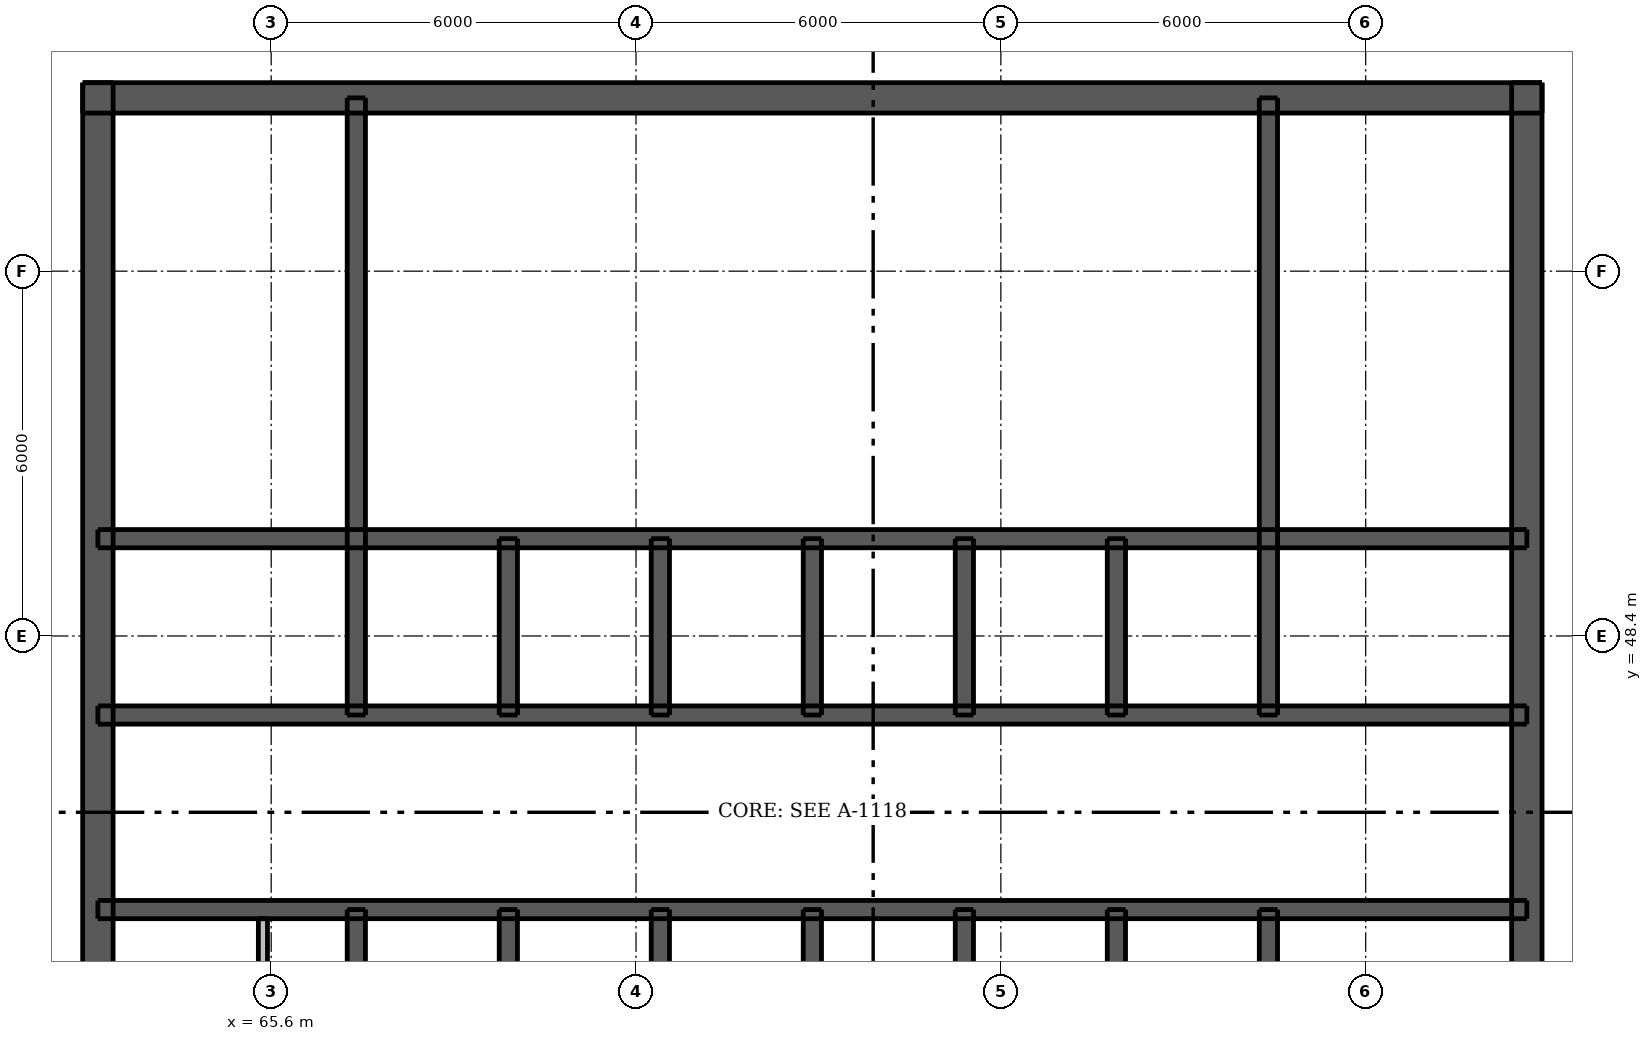
"""IFC4 building model, lengths in metres.
Left out: names, types, materials, properties, quantities, classifications, styles, units other than length and angle.
Written with IfcOpenShell. Run it as: python <this file> out.ifc"""

import sys

from ifc_helpers import new_model, si_unit, direction, frame, frame_2d, origin, place, context, subcontext, project, spatial, rectangle, extrude, element, fill, save


model = new_model("IFC4")
c1 = context("Model", 3, precision=1e-05, world=origin(), true_north=direction((0.0, 1.0)))
c2 = subcontext(c1, "Body", "Model", "MODEL_VIEW")
j1 = project(units=[si_unit("LENGTHUNIT", "METRE"), si_unit("PLANEANGLEUNIT", "RADIAN")], contexts=[c1])
p1 = place(None, origin())
s1 = spatial("IfcSite", under=j1, at=p1, CompositionType="ELEMENT")
p2 = place(p1, origin())
s2 = spatial("IfcBuilding", under=s1, at=p2, CompositionType="ELEMENT")
p3 = place(p2, frame((0.0, 0.0, 258.7)))
s3 = spatial("IfcBuildingStorey", under=s2, at=p3, CompositionType="ELEMENT", Elevation=258.7)
p4 = place(p3, frame((62.5, 57.25, 0.0), z_axis=(0.0, 0.0, 1.0), x_axis=(1.0, 0.0, 0.0)))
e1 = element("IfcWall", 1, at=p4, inside=s3, PredefinedType="SHEAR", context=c2, shape_type="SweptSolid", body=[
    extrude(rectangle(XDim=24.0, YDim=0.5, at=frame_2d((12.0, 0.0))), origin(), (0.0, 0.0, 1.0), 3.05),
])
p5 = place(p4, frame((21.025, 0.0, 0.0)))
e2 = element("IfcOpeningElement", 2, at=p5, cuts=e1, PredefinedType="OPENING", context=c2, shape_type="SweptSolid", body=[
    extrude(rectangle(XDim=1.1, YDim=2.1, at=frame_2d((0.55, 1.05))), frame((0.0, 0.26, 0.0), z_axis=(0.0, -1.0, 0.0), x_axis=(1.0, 0.0, 0.0)), (0.0, 0.0, 1.0), 0.52),
])
p6 = place(p4, frame((1.875, 0.0, 0.0)))
e3 = element("IfcOpeningElement", 3, at=p6, cuts=e1, PredefinedType="OPENING", context=c2, shape_type="SweptSolid", body=[
    extrude(rectangle(XDim=1.1, YDim=2.1, at=frame_2d((0.55, 1.05))), frame((0.0, 0.26, 0.0), z_axis=(0.0, -1.0, 0.0), x_axis=(1.0, 0.0, 0.0)), (0.0, 0.0, 1.0), 0.52),
])
p7 = place(p4, frame((11.55, 0.0, 0.0)))
e4 = element("IfcOpeningElement", 4, at=p7, cuts=e1, PredefinedType="OPENING", context=c2, shape_type="SweptSolid", body=[
    extrude(rectangle(XDim=0.9, YDim=2.1, at=frame_2d((0.45, 1.05))), frame((0.0, 0.26, 0.0), z_axis=(0.0, -1.0, 0.0), x_axis=(1.0, 0.0, 0.0)), (0.0, 0.0, 1.0), 0.52),
])
p8 = place(p3, frame((62.75, 33.5, 0.0), z_axis=(0.0, 0.0, 1.0), x_axis=(0.0, 1.0, 0.0)))
e5 = element("IfcWall", 5, at=p8, inside=s3, PredefinedType="SHEAR", context=c2, shape_type="SweptSolid", body=[
    extrude(rectangle(XDim=24.0, YDim=0.5, at=frame_2d((12.0, 0.0))), origin(), (0.0, 0.0, 1.0), 3.05),
])
p9 = place(p8, frame((11.2, 0.0, 0.0)))
e6 = element("IfcOpeningElement", 6, at=p9, cuts=e5, PredefinedType="OPENING", context=c2, shape_type="SweptSolid", body=[
    extrude(rectangle(XDim=1.6, YDim=2.1, at=frame_2d((0.8, 1.05))), frame((0.0, 0.26, 0.0), z_axis=(0.0, -1.0, 0.0), x_axis=(1.0, 0.0, 0.0)), (0.0, 0.0, 1.0), 0.52),
])
p10 = place(p3, frame((86.25, 33.5, 0.0), z_axis=(0.0, 0.0, 1.0), x_axis=(0.0, 1.0, 0.0)))
e7 = element("IfcWall", 7, at=p10, inside=s3, PredefinedType="SHEAR", context=c2, shape_type="SweptSolid", body=[
    extrude(rectangle(XDim=24.0, YDim=0.5, at=frame_2d((12.0, 0.0))), origin(), (0.0, 0.0, 1.0), 3.05),
])
p11 = place(p10, frame((11.2, 0.0, 0.0)))
e8 = element("IfcOpeningElement", 8, at=p11, cuts=e7, PredefinedType="OPENING", context=c2, shape_type="SweptSolid", body=[
    extrude(rectangle(XDim=1.6, YDim=2.1, at=frame_2d((0.8, 1.05))), frame((0.0, 0.26, 0.0), z_axis=(0.0, -1.0, 0.0), x_axis=(1.0, 0.0, 0.0)), (0.0, 0.0, 1.0), 0.52),
])
p12 = place(p3, frame((62.75, 43.9, 0.0), z_axis=(0.0, 0.0, 1.0), x_axis=(1.0, 0.0, 0.0)))
e9 = element("IfcWall", 9, at=p12, inside=s3, PredefinedType="SHEAR", context=c2, shape_type="SweptSolid", body=[
    extrude(rectangle(XDim=23.5, YDim=0.3, at=frame_2d((11.75, 0.0))), origin(), (0.0, 0.0, 1.0), 3.05),
])
p13 = place(p12, frame((1.032, 0.0, 0.0)))
e10 = element("IfcOpeningElement", 10, at=p13, cuts=e9, PredefinedType="OPENING", context=c2, shape_type="SweptSolid", body=[
    extrude(rectangle(XDim=0.9, YDim=2.1, at=frame_2d((0.45, 1.05))), frame((0.0, 0.16, 0.0), z_axis=(0.0, -1.0, 0.0), x_axis=(1.0, 0.0, 0.0)), (0.0, 0.0, 1.0), 0.32),
])
p14 = place(p12, frame((3.007, 0.0, 0.0)))
e11 = element("IfcOpeningElement", 11, at=p14, cuts=e9, PredefinedType="OPENING", context=c2, shape_type="SweptSolid", body=[
    extrude(rectangle(XDim=0.8, YDim=2.1, at=frame_2d((0.4, 1.05))), frame((0.0, 0.16, 0.0), z_axis=(0.0, -1.0, 0.0), x_axis=(1.0, 0.0, 0.0)), (0.0, 0.0, 1.0), 0.32),
])
p15 = place(p12, frame((20.875, 0.0, 0.0)))
e12 = element("IfcOpeningElement", 12, at=p15, cuts=e9, PredefinedType="OPENING", context=c2, shape_type="SweptSolid", body=[
    extrude(rectangle(XDim=0.9, YDim=2.1, at=frame_2d((0.45, 1.05))), frame((0.0, 0.16, 0.0), z_axis=(0.0, -1.0, 0.0), x_axis=(1.0, 0.0, 0.0)), (0.0, 0.0, 1.0), 0.32),
])
p16 = place(p12, frame((5.05, 0.0, 0.0)))
e13 = element("IfcOpeningElement", 13, at=p16, cuts=e9, PredefinedType="OPENING", context=c2, shape_type="SweptSolid", body=[
    extrude(rectangle(XDim=0.9, YDim=2.1, at=frame_2d((0.45, 1.05))), frame((0.0, 0.16, 0.0), z_axis=(0.0, -1.0, 0.0), x_axis=(1.0, 0.0, 0.0)), (0.0, 0.0, 1.0), 0.32),
])
p17 = place(p12, frame((10.05, 0.0, 0.0)))
e14 = element("IfcOpeningElement", 14, at=p17, cuts=e9, PredefinedType="OPENING", context=c2, shape_type="SweptSolid", body=[
    extrude(rectangle(XDim=0.9, YDim=2.1, at=frame_2d((0.45, 1.05))), frame((0.0, 0.16, 0.0), z_axis=(0.0, -1.0, 0.0), x_axis=(1.0, 0.0, 0.0)), (0.0, 0.0, 1.0), 0.32),
])
p18 = place(p12, frame((12.55, 0.0, 0.0)))
e15 = element("IfcOpeningElement", 15, at=p18, cuts=e9, PredefinedType="OPENING", context=c2, shape_type="SweptSolid", body=[
    extrude(rectangle(XDim=0.9, YDim=2.1, at=frame_2d((0.45, 1.05))), frame((0.0, 0.16, 0.0), z_axis=(0.0, -1.0, 0.0), x_axis=(1.0, 0.0, 0.0)), (0.0, 0.0, 1.0), 0.32),
])
p19 = place(p12, frame((17.55, 0.0, 0.0)))
e16 = element("IfcOpeningElement", 16, at=p19, cuts=e9, PredefinedType="OPENING", context=c2, shape_type="SweptSolid", body=[
    extrude(rectangle(XDim=0.9, YDim=2.1, at=frame_2d((0.45, 1.05))), frame((0.0, 0.16, 0.0), z_axis=(0.0, -1.0, 0.0), x_axis=(1.0, 0.0, 0.0)), (0.0, 0.0, 1.0), 0.32),
])
p20 = place(p3, frame((62.75, 47.1, 0.0), z_axis=(0.0, 0.0, 1.0), x_axis=(1.0, 0.0, 0.0)))
e17 = element("IfcWall", 17, at=p20, inside=s3, PredefinedType="SHEAR", context=c2, shape_type="SweptSolid", body=[
    extrude(rectangle(XDim=23.5, YDim=0.3, at=frame_2d((11.75, 0.0))), origin(), (0.0, 0.0, 1.0), 3.05),
])
p21 = place(p20, frame((1.725, 0.0, 0.0)))
e18 = element("IfcOpeningElement", 18, at=p21, cuts=e17, PredefinedType="OPENING", context=c2, shape_type="SweptSolid", body=[
    extrude(rectangle(XDim=0.9, YDim=2.1, at=frame_2d((0.45, 1.05))), frame((0.0, 0.16, 0.0), z_axis=(0.0, -1.0, 0.0), x_axis=(1.0, 0.0, 0.0)), (0.0, 0.0, 1.0), 0.32),
])
p22 = place(p20, frame((20.875, 0.0, 0.0)))
e19 = element("IfcOpeningElement", 19, at=p22, cuts=e17, PredefinedType="OPENING", context=c2, shape_type="SweptSolid", body=[
    extrude(rectangle(XDim=0.9, YDim=2.1, at=frame_2d((0.45, 1.05))), frame((0.0, 0.16, 0.0), z_axis=(0.0, -1.0, 0.0), x_axis=(1.0, 0.0, 0.0)), (0.0, 0.0, 1.0), 0.32),
])
p23 = place(p20, frame((4.95, 0.0, 0.0)))
e20 = element("IfcOpeningElement", 20, at=p23, cuts=e17, PredefinedType="OPENING", context=c2, shape_type="SweptSolid", body=[
    extrude(rectangle(XDim=1.1, YDim=2.1, at=frame_2d((0.55, 1.05))), frame((0.0, 0.16, 0.0), z_axis=(0.0, -1.0, 0.0), x_axis=(1.0, 0.0, 0.0)), (0.0, 0.0, 1.0), 0.32),
])
p24 = place(p20, frame((7.45, 0.0, 0.0)))
e21 = element("IfcOpeningElement", 21, at=p24, cuts=e17, PredefinedType="OPENING", context=c2, shape_type="SweptSolid", body=[
    extrude(rectangle(XDim=1.1, YDim=2.1, at=frame_2d((0.55, 1.05))), frame((0.0, 0.16, 0.0), z_axis=(0.0, -1.0, 0.0), x_axis=(1.0, 0.0, 0.0)), (0.0, 0.0, 1.0), 0.32),
])
p25 = place(p20, frame((9.95, 0.0, 0.0)))
e22 = element("IfcOpeningElement", 22, at=p25, cuts=e17, PredefinedType="OPENING", context=c2, shape_type="SweptSolid", body=[
    extrude(rectangle(XDim=1.1, YDim=2.1, at=frame_2d((0.55, 1.05))), frame((0.0, 0.16, 0.0), z_axis=(0.0, -1.0, 0.0), x_axis=(1.0, 0.0, 0.0)), (0.0, 0.0, 1.0), 0.32),
])
p26 = place(p20, frame((12.45, 0.0, 0.0)))
e23 = element("IfcOpeningElement", 23, at=p26, cuts=e17, PredefinedType="OPENING", context=c2, shape_type="SweptSolid", body=[
    extrude(rectangle(XDim=1.1, YDim=2.1, at=frame_2d((0.55, 1.05))), frame((0.0, 0.16, 0.0), z_axis=(0.0, -1.0, 0.0), x_axis=(1.0, 0.0, 0.0)), (0.0, 0.0, 1.0), 0.32),
])
p27 = place(p20, frame((14.95, 0.0, 0.0)))
e24 = element("IfcOpeningElement", 24, at=p27, cuts=e17, PredefinedType="OPENING", context=c2, shape_type="SweptSolid", body=[
    extrude(rectangle(XDim=1.1, YDim=2.1, at=frame_2d((0.55, 1.05))), frame((0.0, 0.16, 0.0), z_axis=(0.0, -1.0, 0.0), x_axis=(1.0, 0.0, 0.0)), (0.0, 0.0, 1.0), 0.32),
])
p28 = place(p20, frame((17.45, 0.0, 0.0)))
e25 = element("IfcOpeningElement", 25, at=p28, cuts=e17, PredefinedType="OPENING", context=c2, shape_type="SweptSolid", body=[
    extrude(rectangle(XDim=1.1, YDim=2.1, at=frame_2d((0.55, 1.05))), frame((0.0, 0.16, 0.0), z_axis=(0.0, -1.0, 0.0), x_axis=(1.0, 0.0, 0.0)), (0.0, 0.0, 1.0), 0.32),
])
p29 = place(p3, frame((62.75, 50.0, 0.0), z_axis=(0.0, 0.0, 1.0), x_axis=(1.0, 0.0, 0.0)))
e26 = element("IfcWall", 26, at=p29, inside=s3, PredefinedType="SHEAR", context=c2, shape_type="SweptSolid", body=[
    extrude(rectangle(XDim=23.5, YDim=0.3, at=frame_2d((11.75, 0.0))), origin(), (0.0, 0.0, 1.0), 3.05),
])
p30 = place(p3, frame((67.0, 33.75, 0.0), z_axis=(0.0, 0.0, 1.0), x_axis=(0.0, 1.0, 0.0)))
e27 = element("IfcWall", 27, at=p30, inside=s3, PredefinedType="SHEAR", context=c2, shape_type="SweptSolid", body=[
    extrude(rectangle(XDim=10.15, YDim=0.3, at=frame_2d((5.075, 0.0))), origin(), (0.0, 0.0, 1.0), 3.05),
])
p31 = place(p30, frame((0.45, 0.0, 0.0)))
e28 = element("IfcOpeningElement", 28, at=p31, cuts=e27, PredefinedType="OPENING", context=c2, shape_type="SweptSolid", body=[
    extrude(rectangle(XDim=1.1, YDim=2.1, at=frame_2d((0.55, 1.05))), frame((0.0, 0.16, 0.0), z_axis=(0.0, -1.0, 0.0), x_axis=(1.0, 0.0, 0.0)), (0.0, 0.0, 1.0), 0.32),
])
for number, where, z_axis, x_axis in (
    (29, (67.0, 47.1, 0.0), (0.0, 0.0, 1.0), (0.0, 1.0, 0.0)),
    (30, (82.0, 33.75, 0.0), (0.0, 0.0, 1.0), (0.0, 1.0, 0.0)),
    (31, (82.0, 47.1, 0.0), (0.0, 0.0, 1.0), (0.0, 1.0, 0.0)),
):
    element("IfcWall", number, at=place(p3, frame(where, z_axis=z_axis, x_axis=x_axis)), inside=s3, PredefinedType="SHEAR", context=c2, shape_type="SweptSolid", body=[
        extrude(rectangle(XDim=10.15, YDim=0.3, at=frame_2d((5.075, 0.0))), origin(), (0.0, 0.0, 1.0), 3.05),
    ])
for number, where, z_axis, x_axis in (
    (32, (69.5, 41.0, 0.0), (0.0, 0.0, 1.0), (0.0, 1.0, 0.0)),
    (33, (69.5, 47.1, 0.0), (0.0, 0.0, 1.0), (0.0, 1.0, 0.0)),
    (34, (72.0, 41.0, 0.0), (0.0, 0.0, 1.0), (0.0, 1.0, 0.0)),
    (35, (72.0, 47.1, 0.0), (0.0, 0.0, 1.0), (0.0, 1.0, 0.0)),
    (36, (74.5, 41.0, 0.0), (0.0, 0.0, 1.0), (0.0, 1.0, 0.0)),
    (37, (74.5, 47.1, 0.0), (0.0, 0.0, 1.0), (0.0, 1.0, 0.0)),
    (38, (77.0, 41.0, 0.0), (0.0, 0.0, 1.0), (0.0, 1.0, 0.0)),
    (39, (77.0, 47.1, 0.0), (0.0, 0.0, 1.0), (0.0, 1.0, 0.0)),
    (40, (79.5, 41.0, 0.0), (0.0, 0.0, 1.0), (0.0, 1.0, 0.0)),
    (41, (79.5, 47.1, 0.0), (0.0, 0.0, 1.0), (0.0, 1.0, 0.0)),
):
    element("IfcWall", number, at=place(p3, frame(where, z_axis=z_axis, x_axis=x_axis)), inside=s3, PredefinedType="SHEAR", context=c2, shape_type="SweptSolid", body=[
        extrude(rectangle(XDim=2.9, YDim=0.3, at=frame_2d((1.45, 0.0))), origin(), (0.0, 0.0, 1.0), 3.05),
    ])
p32 = place(p3, frame((65.464, 41.15, 0.0), z_axis=(0.0, 0.0, 1.0), x_axis=(0.0, 1.0, 0.0)))
e42 = element("IfcWall", 42, at=p32, inside=s3, PredefinedType="PLUMBINGWALL", context=c2, shape_type="SweptSolid", body=[
    extrude(rectangle(XDim=2.6, YDim=0.15, at=frame_2d((1.3, 0.0))), origin(), (0.0, 0.0, 1.0), 3.05),
])
p33 = place(p5, origin())
e43 = element("IfcDoor", 43, at=p33, inside=s3, OperationType="SINGLE_SWING_RIGHT", PredefinedType="DOOR", context=c2, shape_type="SweptSolid", body=[
    extrude(rectangle(XDim=1.1, YDim=2.1, at=frame_2d((0.55, 1.05))), frame((0.0, -0.188, 0.0), z_axis=(0.0, -1.0, 0.0), x_axis=(1.0, 0.0, 0.0)), (0.0, 0.0, 1.0), 0.05),
])
fill(e2, e43)
p34 = place(p6, origin())
e44 = element("IfcDoor", 44, at=p34, inside=s3, OperationType="SINGLE_SWING_LEFT", PredefinedType="DOOR", context=c2, shape_type="SweptSolid", body=[
    extrude(rectangle(XDim=1.1, YDim=2.1, at=frame_2d((0.55, 1.05))), frame((0.0, -0.188, 0.0), z_axis=(0.0, -1.0, 0.0), x_axis=(1.0, 0.0, 0.0)), (0.0, 0.0, 1.0), 0.05),
])
fill(e3, e44)
p35 = place(p9, origin())
e45 = element("IfcDoor", 45, at=p35, inside=s3, OperationType="DOUBLE_DOOR_SINGLE_SWING", PredefinedType="DOOR", context=c2, shape_type="SweptSolid", body=[
    extrude(rectangle(XDim=1.6, YDim=2.1, at=frame_2d((0.8, 1.05))), frame((0.0, -0.188, 0.0), z_axis=(0.0, -1.0, 0.0), x_axis=(1.0, 0.0, 0.0)), (0.0, 0.0, 1.0), 0.05),
])
fill(e6, e45)
p36 = place(p11, origin())
e46 = element("IfcDoor", 46, at=p36, inside=s3, OperationType="DOUBLE_DOOR_SINGLE_SWING", PredefinedType="DOOR", context=c2, shape_type="SweptSolid", body=[
    extrude(rectangle(XDim=1.6, YDim=2.1, at=frame_2d((0.8, 1.05))), frame((0.0, 0.237, 0.0), z_axis=(0.0, -1.0, 0.0), x_axis=(1.0, 0.0, 0.0)), (0.0, 0.0, 1.0), 0.05),
])
fill(e8, e46)
p37 = place(p13, origin())
e47 = element("IfcDoor", 47, at=p37, inside=s3, OperationType="SINGLE_SWING_LEFT", PredefinedType="DOOR", context=c2, shape_type="SweptSolid", body=[
    extrude(rectangle(XDim=0.9, YDim=2.1, at=frame_2d((0.45, 1.05))), frame((0.0, -0.087, 0.0), z_axis=(0.0, -1.0, 0.0), x_axis=(1.0, 0.0, 0.0)), (0.0, 0.0, 1.0), 0.05),
])
fill(e10, e47)
p38 = place(p14, origin())
e48 = element("IfcDoor", 48, at=p38, inside=s3, OperationType="SINGLE_SWING_RIGHT", PredefinedType="DOOR", context=c2, shape_type="SweptSolid", body=[
    extrude(rectangle(XDim=0.8, YDim=2.1, at=frame_2d((0.4, 1.05))), frame((0.0, -0.087, 0.0), z_axis=(0.0, -1.0, 0.0), x_axis=(1.0, 0.0, 0.0)), (0.0, 0.0, 1.0), 0.05),
])
fill(e11, e48)
p39 = place(p15, origin())
e49 = element("IfcDoor", 49, at=p39, inside=s3, OperationType="SINGLE_SWING_LEFT", PredefinedType="DOOR", context=c2, shape_type="SweptSolid", body=[
    extrude(rectangle(XDim=0.9, YDim=2.1, at=frame_2d((0.45, 1.05))), frame((0.0, -0.087, 0.0), z_axis=(0.0, -1.0, 0.0), x_axis=(1.0, 0.0, 0.0)), (0.0, 0.0, 1.0), 0.05),
])
fill(e12, e49)
p40 = place(p21, origin())
e50 = element("IfcDoor", 50, at=p40, inside=s3, OperationType="SINGLE_SWING_LEFT", PredefinedType="DOOR", context=c2, shape_type="SweptSolid", body=[
    extrude(rectangle(XDim=0.9, YDim=2.1, at=frame_2d((0.45, 1.05))), frame((0.0, 0.138, 0.0), z_axis=(0.0, -1.0, 0.0), x_axis=(1.0, 0.0, 0.0)), (0.0, 0.0, 1.0), 0.05),
])
fill(e18, e50)
p41 = place(p22, origin())
e51 = element("IfcDoor", 51, at=p41, inside=s3, OperationType="SINGLE_SWING_LEFT", PredefinedType="DOOR", context=c2, shape_type="SweptSolid", body=[
    extrude(rectangle(XDim=0.9, YDim=2.1, at=frame_2d((0.45, 1.05))), frame((0.0, 0.138, 0.0), z_axis=(0.0, -1.0, 0.0), x_axis=(1.0, 0.0, 0.0)), (0.0, 0.0, 1.0), 0.05),
])
fill(e19, e51)
p42 = place(p7, origin())
e52 = element("IfcDoor", 52, at=p42, inside=s3, OperationType="SINGLE_SWING_RIGHT", PredefinedType="DOOR", context=c2, shape_type="SweptSolid", body=[
    extrude(rectangle(XDim=0.9, YDim=2.1, at=frame_2d((0.45, 1.05))), frame((0.0, -0.188, 0.0), z_axis=(0.0, -1.0, 0.0), x_axis=(1.0, 0.0, 0.0)), (0.0, 0.0, 1.0), 0.05),
])
fill(e4, e52)
p43 = place(p16, origin())
e53 = element("IfcDoor", 53, at=p43, inside=s3, OperationType="SINGLE_SWING_RIGHT", PredefinedType="DOOR", context=c2, shape_type="SweptSolid", body=[
    extrude(rectangle(XDim=0.9, YDim=2.1, at=frame_2d((0.45, 1.05))), frame((0.0, -0.087, 0.0), z_axis=(0.0, -1.0, 0.0), x_axis=(1.0, 0.0, 0.0)), (0.0, 0.0, 1.0), 0.05),
])
fill(e13, e53)
p44 = place(p17, origin())
e54 = element("IfcDoor", 54, at=p44, inside=s3, OperationType="SINGLE_SWING_RIGHT", PredefinedType="DOOR", context=c2, shape_type="SweptSolid", body=[
    extrude(rectangle(XDim=0.9, YDim=2.1, at=frame_2d((0.45, 1.05))), frame((0.0, -0.087, 0.0), z_axis=(0.0, -1.0, 0.0), x_axis=(1.0, 0.0, 0.0)), (0.0, 0.0, 1.0), 0.05),
])
fill(e14, e54)
p45 = place(p18, origin())
e55 = element("IfcDoor", 55, at=p45, inside=s3, OperationType="SINGLE_SWING_LEFT", PredefinedType="DOOR", context=c2, shape_type="SweptSolid", body=[
    extrude(rectangle(XDim=0.9, YDim=2.1, at=frame_2d((0.45, 1.05))), frame((0.0, -0.087, 0.0), z_axis=(0.0, -1.0, 0.0), x_axis=(1.0, 0.0, 0.0)), (0.0, 0.0, 1.0), 0.05),
])
fill(e15, e55)
p46 = place(p19, origin())
e56 = element("IfcDoor", 56, at=p46, inside=s3, OperationType="SINGLE_SWING_LEFT", PredefinedType="DOOR", context=c2, shape_type="SweptSolid", body=[
    extrude(rectangle(XDim=0.9, YDim=2.1, at=frame_2d((0.45, 1.05))), frame((0.0, -0.087, 0.0), z_axis=(0.0, -1.0, 0.0), x_axis=(1.0, 0.0, 0.0)), (0.0, 0.0, 1.0), 0.05),
])
fill(e16, e56)
p47 = place(p23, origin())
e57 = element("IfcDoor", 57, at=p47, inside=s3, OperationType="DOUBLE_DOOR_SLIDING", PredefinedType="DOOR", context=c2, shape_type="SweptSolid", body=[
    extrude(rectangle(XDim=1.1, YDim=2.1, at=frame_2d((0.55, 1.05))), frame((0.0, 0.025, 0.0), z_axis=(0.0, -1.0, 0.0), x_axis=(1.0, 0.0, 0.0)), (0.0, 0.0, 1.0), 0.05),
])
fill(e20, e57)
p48 = place(p24, origin())
e58 = element("IfcDoor", 58, at=p48, inside=s3, OperationType="DOUBLE_DOOR_SLIDING", PredefinedType="DOOR", context=c2, shape_type="SweptSolid", body=[
    extrude(rectangle(XDim=1.1, YDim=2.1, at=frame_2d((0.55, 1.05))), frame((0.0, 0.025, 0.0), z_axis=(0.0, -1.0, 0.0), x_axis=(1.0, 0.0, 0.0)), (0.0, 0.0, 1.0), 0.05),
])
fill(e21, e58)
p49 = place(p25, origin())
e59 = element("IfcDoor", 59, at=p49, inside=s3, OperationType="DOUBLE_DOOR_SLIDING", PredefinedType="DOOR", context=c2, shape_type="SweptSolid", body=[
    extrude(rectangle(XDim=1.1, YDim=2.1, at=frame_2d((0.55, 1.05))), frame((0.0, 0.025, 0.0), z_axis=(0.0, -1.0, 0.0), x_axis=(1.0, 0.0, 0.0)), (0.0, 0.0, 1.0), 0.05),
])
fill(e22, e59)
p50 = place(p26, origin())
e60 = element("IfcDoor", 60, at=p50, inside=s3, OperationType="DOUBLE_DOOR_SLIDING", PredefinedType="DOOR", context=c2, shape_type="SweptSolid", body=[
    extrude(rectangle(XDim=1.1, YDim=2.1, at=frame_2d((0.55, 1.05))), frame((0.0, 0.025, 0.0), z_axis=(0.0, -1.0, 0.0), x_axis=(1.0, 0.0, 0.0)), (0.0, 0.0, 1.0), 0.05),
])
fill(e23, e60)
p51 = place(p27, origin())
e61 = element("IfcDoor", 61, at=p51, inside=s3, OperationType="DOUBLE_DOOR_SLIDING", PredefinedType="DOOR", context=c2, shape_type="SweptSolid", body=[
    extrude(rectangle(XDim=1.1, YDim=2.1, at=frame_2d((0.55, 1.05))), frame((0.0, 0.025, 0.0), z_axis=(0.0, -1.0, 0.0), x_axis=(1.0, 0.0, 0.0)), (0.0, 0.0, 1.0), 0.05),
])
fill(e24, e61)
p52 = place(p28, origin())
e62 = element("IfcDoor", 62, at=p52, inside=s3, OperationType="DOUBLE_DOOR_SLIDING", PredefinedType="DOOR", context=c2, shape_type="SweptSolid", body=[
    extrude(rectangle(XDim=1.1, YDim=2.1, at=frame_2d((0.55, 1.05))), frame((0.0, 0.025, 0.0), z_axis=(0.0, -1.0, 0.0), x_axis=(1.0, 0.0, 0.0)), (0.0, 0.0, 1.0), 0.05),
])
fill(e25, e62)
save(model, sys.argv[1])
